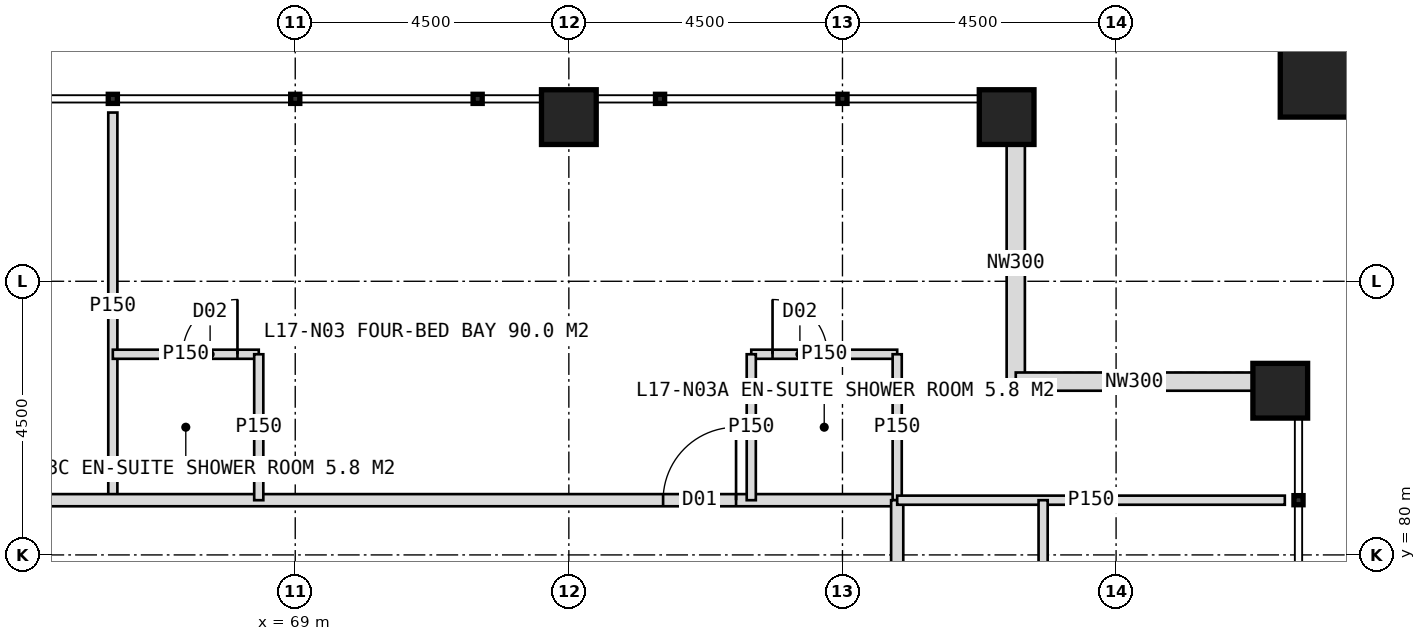
"""IFC4 building model, lengths in metres.
Left out: names, types, materials, properties, quantities, classifications, styles, units other than length and angle.
Written with IfcOpenShell. Run it as: python <this file> out.ifc"""

import sys

from ifc_helpers import new_model, si_unit, direction, frame, frame_2d, origin, origin_2d, place, context, subcontext, project, spatial, rectangle, hollow_rectangle, extrude, element, fill, save


model = new_model("IFC4")
c1 = context("Model", 3, precision=1e-05, world=origin(), true_north=direction((0.0, 1.0)))
c2 = subcontext(c1, "Body", "Model", "MODEL_VIEW")
j1 = project(units=[si_unit("LENGTHUNIT", "METRE"), si_unit("PLANEANGLEUNIT", "RADIAN")], contexts=[c1])
p1 = place(None, origin())
s1 = spatial("IfcSite", under=j1, at=p1, CompositionType="ELEMENT")
p2 = place(p1, origin())
s2 = spatial("IfcBuilding", under=s1, at=p2, CompositionType="ELEMENT")
p3 = place(p2, frame((0.0, 0.0, 75.0)))
s3 = spatial("IfcBuildingStorey", under=s2, at=p3, CompositionType="ELEMENT", Elevation=75.0)
for number, where, z_axis, x_axis in (
    (1, (73.5, 87.2, 0.0), (0.0, 0.0, 1.0), (1.0, 0.0, 0.0)),
    (2, (80.7, 87.2, 0.0), (0.0, 0.0, 1.0), (1.0, 0.0, 0.0)),
    (3, (85.2, 82.7, 0.0), (0.0, 0.0, 1.0), (1.0, 0.0, 0.0)),
):
    element("IfcColumn", number, at=place(p3, frame(where, z_axis=z_axis, x_axis=x_axis)), inside=s3, PredefinedType="COLUMN", context=c2, shape_type="SweptSolid", body=[
        extrude(hollow_rectangle(XDim=0.9, YDim=0.9, WallThickness=0.08, at=origin_2d()), origin(), (0.0, 0.0, 1.0), 4.0),
    ])
p4 = place(p3, frame((86.1, 88.1, 0.0), z_axis=(0.0, 0.0, 1.0), x_axis=(1.0, 0.0, 0.0)))
e4 = element("IfcColumn", 4, at=p4, inside=s3, PredefinedType="COLUMN", context=c2, shape_type="SweptSolid", body=[
    extrude(hollow_rectangle(XDim=1.8, YDim=1.8, WallThickness=0.1, at=origin_2d()), origin(), (0.0, 0.0, 1.0), 4.0),
])
for number, where, z_axis, x_axis in (
    (5, (80.85, 86.75, 0.0), (0.0, 0.0, 1.0), (0.0, -1.0, 0.0)),
    (6, (80.85, 82.85, 0.0), (0.0, 0.0, 1.0), (1.0, 0.0, 0.0)),
):
    element("IfcWall", number, at=place(p3, frame(where, z_axis=z_axis, x_axis=x_axis)), inside=s3, PredefinedType="ELEMENTEDWALL", context=c2, shape_type="SweptSolid", body=[
        extrude(rectangle(XDim=3.9, YDim=0.3, at=frame_2d((1.95, 0.0))), origin(), (0.0, 0.0, 1.0), 2.95),
    ])
p5 = place(p3, frame((66.0, 80.9, 0.0), z_axis=(0.0, 0.0, 1.0), x_axis=(0.0, 1.0, 0.0)))
e7 = element("IfcWall", 7, at=p5, inside=s3, PredefinedType="PARTITIONING", context=c2, shape_type="SweptSolid", body=[
    extrude(rectangle(XDim=6.375, YDim=0.15, at=frame_2d((3.188, 0.0))), origin(), (0.0, 0.0, 1.0), 3.75),
])
p6 = place(p3, frame((41.1, 80.9, 0.0), z_axis=(0.0, 0.0, 1.0), x_axis=(1.0, 0.0, 0.0)))
e8 = element("IfcWall", 8, at=p6, inside=s3, PredefinedType="PARTITIONING", context=c2, shape_type="SweptSolid", body=[
    extrude(rectangle(XDim=37.8, YDim=0.2, at=frame_2d((18.9, 0.0))), origin(), (0.0, 0.0, 1.0), 3.75),
])
p7 = place(p6, frame((5.85, 0.0, 0.0)))
e9 = element("IfcOpeningElement", 9, at=p7, cuts=e8, PredefinedType="OPENING", context=c2, shape_type="SweptSolid", body=[
    extrude(rectangle(XDim=1.2, YDim=2.2, at=frame_2d((0.6, 1.1))), frame((0.0, 0.11, 0.0), z_axis=(0.0, -1.0, 0.0), x_axis=(1.0, 0.0, 0.0)), (0.0, 0.0, 1.0), 0.22),
])
p8 = place(p6, frame((18.3, 0.0, 0.0)))
e10 = element("IfcOpeningElement", 10, at=p8, cuts=e8, PredefinedType="OPENING", context=c2, shape_type="SweptSolid", body=[
    extrude(rectangle(XDim=1.2, YDim=2.2, at=frame_2d((0.6, 1.1))), frame((0.0, 0.11, 0.0), z_axis=(0.0, -1.0, 0.0), x_axis=(1.0, 0.0, 0.0)), (0.0, 0.0, 1.0), 0.22),
])
p9 = place(p6, frame((33.95, 0.0, 0.0)))
e11 = element("IfcOpeningElement", 11, at=p9, cuts=e8, PredefinedType="OPENING", context=c2, shape_type="SweptSolid", body=[
    extrude(rectangle(XDim=1.2, YDim=2.2, at=frame_2d((0.6, 1.1))), frame((0.0, 0.11, 0.0), z_axis=(0.0, -1.0, 0.0), x_axis=(1.0, 0.0, 0.0)), (0.0, 0.0, 1.0), 0.22),
])
p10 = place(p3, frame((76.5, 83.3, 0.0), z_axis=(0.0, 0.0, 1.0), x_axis=(1.0, 0.0, 0.0)))
e12 = element("IfcWall", 12, at=p10, inside=s3, PredefinedType="PARTITIONING", context=c2, shape_type="SweptSolid", body=[
    extrude(rectangle(XDim=2.4, YDim=0.15, at=frame_2d((1.2, 0.0))), origin(), (0.0, 0.0, 1.0), 3.75),
])
p11 = place(p10, frame((0.35, 0.0, 0.0)))
e13 = element("IfcOpeningElement", 13, at=p11, cuts=e12, PredefinedType="OPENING", context=c2, shape_type="SweptSolid", body=[
    extrude(rectangle(XDim=0.9, YDim=2.1, at=frame_2d((0.45, 1.05))), frame((0.0, 0.085, 0.0), z_axis=(0.0, -1.0, 0.0), x_axis=(1.0, 0.0, 0.0)), (0.0, 0.0, 1.0), 0.17),
])
p12 = place(p3, frame((76.5, 80.9, 0.0), z_axis=(0.0, 0.0, 1.0), x_axis=(0.0, 1.0, 0.0)))
e14 = element("IfcWall", 14, at=p12, inside=s3, PredefinedType="PARTITIONING", context=c2, shape_type="SweptSolid", body=[
    extrude(rectangle(XDim=2.4, YDim=0.15, at=frame_2d((1.2, 0.0))), origin(), (0.0, 0.0, 1.0), 3.75),
])
p13 = place(p3, frame((66.0, 83.3, 0.0), z_axis=(0.0, 0.0, 1.0), x_axis=(1.0, 0.0, 0.0)))
e15 = element("IfcWall", 15, at=p13, inside=s3, PredefinedType="PARTITIONING", context=c2, shape_type="SweptSolid", body=[
    extrude(rectangle(XDim=2.4, YDim=0.15, at=frame_2d((1.2, 0.0))), origin(), (0.0, 0.0, 1.0), 3.75),
])
p14 = place(p13, frame((1.15, 0.0, 0.0)))
e16 = element("IfcOpeningElement", 16, at=p14, cuts=e15, PredefinedType="OPENING", context=c2, shape_type="SweptSolid", body=[
    extrude(rectangle(XDim=0.9, YDim=2.1, at=frame_2d((0.45, 1.05))), frame((0.0, 0.085, 0.0), z_axis=(0.0, -1.0, 0.0), x_axis=(1.0, 0.0, 0.0)), (0.0, 0.0, 1.0), 0.17),
])
for number, where, z_axis, x_axis in (
    (17, (68.4, 80.9, 0.0), (0.0, 0.0, 1.0), (0.0, 1.0, 0.0)),
    (18, (78.9, 80.9, 0.0), (0.0, 0.0, 1.0), (0.0, 1.0, 0.0)),
):
    element("IfcWall", number, at=place(p3, frame(where, z_axis=z_axis, x_axis=x_axis)), inside=s3, PredefinedType="PARTITIONING", context=c2, shape_type="SweptSolid", body=[
        extrude(rectangle(XDim=2.4, YDim=0.15, at=frame_2d((1.2, 0.0))), origin(), (0.0, 0.0, 1.0), 3.75),
    ])
p15 = place(p3, frame((78.9, 80.9, 0.0), z_axis=(0.0, 0.0, 1.0), x_axis=(0.0, -1.0, 0.0)))
e19 = element("IfcWall", 19, at=p15, inside=s3, PredefinedType="PARTITIONING", context=c2, shape_type="SweptSolid", body=[
    extrude(rectangle(XDim=37.8, YDim=0.2, at=frame_2d((18.9, 0.0))), origin(), (0.0, 0.0, 1.0), 3.75),
])
p16 = place(p15, frame((2.45, 0.0, 0.0)))
e20 = element("IfcOpeningElement", 20, at=p16, cuts=e19, PredefinedType="OPENING", context=c2, shape_type="SweptSolid", body=[
    extrude(rectangle(XDim=1.2, YDim=2.2, at=frame_2d((0.6, 1.1))), frame((0.0, 0.11, 0.0), z_axis=(0.0, -1.0, 0.0), x_axis=(1.0, 0.0, 0.0)), (0.0, 0.0, 1.0), 0.22),
])
p17 = place(p15, frame((9.55, 0.0, 0.0)))
e21 = element("IfcOpeningElement", 21, at=p17, cuts=e19, PredefinedType="OPENING", context=c2, shape_type="SweptSolid", body=[
    extrude(rectangle(XDim=1.2, YDim=2.2, at=frame_2d((0.6, 1.1))), frame((0.0, 0.11, 0.0), z_axis=(0.0, -1.0, 0.0), x_axis=(1.0, 0.0, 0.0)), (0.0, 0.0, 1.0), 0.22),
])
p18 = place(p15, frame((15.05, 0.0, 0.0)))
e22 = element("IfcOpeningElement", 22, at=p18, cuts=e19, PredefinedType="OPENING", context=c2, shape_type="SweptSolid", body=[
    extrude(rectangle(XDim=1.2, YDim=2.2, at=frame_2d((0.6, 1.1))), frame((0.0, 0.11, 0.0), z_axis=(0.0, -1.0, 0.0), x_axis=(1.0, 0.0, 0.0)), (0.0, 0.0, 1.0), 0.22),
])
p19 = place(p15, frame((21.55, 0.0, 0.0)))
e23 = element("IfcOpeningElement", 23, at=p19, cuts=e19, PredefinedType="OPENING", context=c2, shape_type="SweptSolid", body=[
    extrude(rectangle(XDim=1.2, YDim=2.2, at=frame_2d((0.6, 1.1))), frame((0.0, 0.11, 0.0), z_axis=(0.0, -1.0, 0.0), x_axis=(1.0, 0.0, 0.0)), (0.0, 0.0, 1.0), 0.22),
])
p20 = place(p15, frame((33.95, 0.0, 0.0)))
e24 = element("IfcOpeningElement", 24, at=p20, cuts=e19, PredefinedType="OPENING", context=c2, shape_type="SweptSolid", body=[
    extrude(rectangle(XDim=1.2, YDim=2.2, at=frame_2d((0.6, 1.1))), frame((0.0, 0.11, 0.0), z_axis=(0.0, -1.0, 0.0), x_axis=(1.0, 0.0, 0.0)), (0.0, 0.0, 1.0), 0.22),
])
p21 = place(p3, frame((78.9, 80.9, 0.0), z_axis=(0.0, 0.0, 1.0), x_axis=(1.0, 0.0, 0.0)))
e25 = element("IfcWall", 25, at=p21, inside=s3, PredefinedType="PARTITIONING", context=c2, shape_type="SweptSolid", body=[
    extrude(rectangle(XDim=6.375, YDim=0.15, at=frame_2d((3.188, 0.0))), origin(), (0.0, 0.0, 1.0), 3.75),
])
p22 = place(p3, frame((81.3, 80.9, 0.0), z_axis=(0.0, 0.0, 1.0), x_axis=(0.0, -1.0, 0.0)))
e26 = element("IfcWall", 26, at=p22, inside=s3, PredefinedType="PARTITIONING", context=c2, shape_type="SweptSolid", body=[
    extrude(rectangle(XDim=3.9, YDim=0.15, at=frame_2d((1.95, 0.0))), origin(), (0.0, 0.0, 1.0), 3.75),
])
p23 = place(p22, frame((2.45, 0.0, 0.0)))
e27 = element("IfcOpeningElement", 27, at=p23, cuts=e26, PredefinedType="OPENING", context=c2, shape_type="SweptSolid", body=[
    extrude(rectangle(XDim=1.2, YDim=2.2, at=frame_2d((0.6, 1.1))), frame((0.0, 0.085, 0.0), z_axis=(0.0, -1.0, 0.0), x_axis=(1.0, 0.0, 0.0)), (0.0, 0.0, 1.0), 0.17),
])
p24 = place(p9, origin())
e28 = element("IfcDoor", 28, at=p24, inside=s3, OperationType="SINGLE_SWING_RIGHT", PredefinedType="DOOR", context=c2, shape_type="SweptSolid", body=[
    extrude(rectangle(XDim=1.2, YDim=2.2, at=frame_2d((0.6, 1.1))), frame((0.0, 0.025, 0.0), z_axis=(0.0, -1.0, 0.0), x_axis=(1.0, 0.0, 0.0)), (0.0, 0.0, 1.0), 0.05),
])
fill(e11, e28)
p25 = place(p11, origin())
e29 = element("IfcDoor", 29, at=p25, inside=s3, OperationType="SINGLE_SWING_LEFT", PredefinedType="DOOR", context=c2, shape_type="SweptSolid", body=[
    extrude(rectangle(XDim=0.9, YDim=2.1, at=frame_2d((0.45, 1.05))), frame((0.0, 0.025, 0.0), z_axis=(0.0, -1.0, 0.0), x_axis=(1.0, 0.0, 0.0)), (0.0, 0.0, 1.0), 0.05),
])
fill(e13, e29)
p26 = place(p14, origin())
e30 = element("IfcDoor", 30, at=p26, inside=s3, OperationType="SINGLE_SWING_RIGHT", PredefinedType="DOOR", context=c2, shape_type="SweptSolid", body=[
    extrude(rectangle(XDim=0.9, YDim=2.1, at=frame_2d((0.45, 1.05))), frame((0.0, 0.025, 0.0), z_axis=(0.0, -1.0, 0.0), x_axis=(1.0, 0.0, 0.0)), (0.0, 0.0, 1.0), 0.05),
])
fill(e16, e30)
save(model, sys.argv[1])
